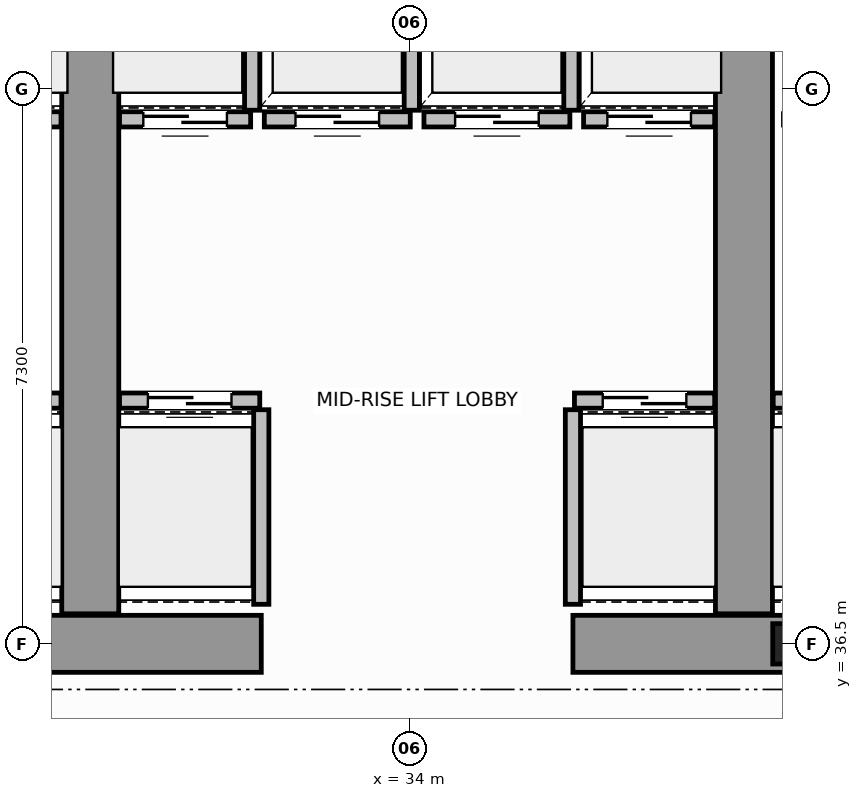
"""IFC4 building model, lengths in metres.
Left out: names, types, materials, properties, quantities, classifications, styles, units other than length and angle.
Written with IfcOpenShell. Run it as: python <this file> out.ifc"""

import sys

from ifc_helpers import new_model, si_unit, direction, frame, frame_2d, origin, origin_2d, place, context, subcontext, project, spatial, rectangle, i_section, extrude, source, transform, mapped, element, fill, save


model = new_model("IFC4")
c1 = context("Model", 3, precision=1e-05, world=origin(), true_north=direction((0.0, 1.0)))
c2 = subcontext(c1, "Body", "Model", "MODEL_VIEW")
j1 = project(units=[si_unit("LENGTHUNIT", "METRE"), si_unit("PLANEANGLEUNIT", "RADIAN")], contexts=[c1])
p1 = place(None, origin())
s1 = spatial("IfcSite", under=j1, at=p1, CompositionType="ELEMENT")
p2 = place(p1, origin())
s2 = spatial("IfcBuilding", under=s1, at=p2, CompositionType="ELEMENT")
p3 = place(p2, frame((0.0, 0.0, 99.6)))
s3 = spatial("IfcBuildingStorey", under=s2, at=p3, CompositionType="ELEMENT", Elevation=99.6)
m1 = source(origin(), c2, "Body", "SweptSolid", [
    extrude(i_section(OverallWidth=0.442, OverallDepth=0.531, WebThickness=0.065, FlangeThickness=0.076, FilletRadius=0.015, at=origin_2d()), origin(), (0.0, 0.0, 1.0), 3.8),
])
p4 = place(p3, frame((39.0, 36.5, 0.0), z_axis=(0.0, 0.0, 1.0), x_axis=(1.0, 0.0, 0.0)))
e1 = element("IfcColumn", 1, at=p4, inside=s3, PredefinedType="COLUMN", context=c2, shape_type="MappedRepresentation", body=[
    mapped(m1, transform((0.0, 0.0, 0.0), scale=1.0)),
])
for number, where, z_axis, x_axis in (
    (2, (27.55, 36.5, 0.0), (0.0, 0.0, 1.0), (1.0, 0.0, 0.0)),
    (3, (36.15, 36.5, 0.0), (0.0, 0.0, 1.0), (1.0, 0.0, 0.0)),
):
    element("IfcWall", number, at=place(p3, frame(where, z_axis=z_axis, x_axis=x_axis)), inside=s3, PredefinedType="SHEAR", context=c2, shape_type="SweptSolid", body=[
        extrude(rectangle(XDim=4.5, YDim=0.75, at=frame_2d((2.25, 0.0))), origin(), (0.0, 0.0, 1.0), 3.8),
    ])
for number, where, z_axis, x_axis in (
    (4, (29.8, 36.895, 0.0), (0.0, 0.0, 1.0), (0.0, 1.0, 0.0)),
    (5, (38.4, 36.895, 0.0), (0.0, 0.0, 1.0), (0.0, 1.0, 0.0)),
):
    element("IfcWall", number, at=place(p3, frame(where, z_axis=z_axis, x_axis=x_axis)), inside=s3, PredefinedType="SHEAR", context=c2, shape_type="SweptSolid", body=[
        extrude(rectangle(XDim=9.305, YDim=0.75, at=frame_2d((4.652, 0.0))), origin(), (0.0, 0.0, 1.0), 3.8),
    ])
p5 = place(p3, frame((27.57, 39.7, 0.0), z_axis=(0.0, 0.0, 1.0), x_axis=(1.0, 0.0, 0.0)))
e6 = element("IfcWall", 6, at=p5, inside=s3, PredefinedType="SOLIDWALL", context=c2, shape_type="SweptSolid", body=[
    extrude(rectangle(XDim=1.845, YDim=0.2, at=frame_2d((0.922, 0.0))), origin(), (0.0, 0.0, 1.0), 3.58),
])
p6 = place(p5, frame((0.372, 0.0, 0.0)))
e7 = element("IfcOpeningElement", 7, at=p6, cuts=e6, PredefinedType="OPENING", context=c2, shape_type="SweptSolid", body=[
    extrude(rectangle(XDim=1.1, YDim=2.15, at=frame_2d((0.55, 1.075))), frame((0.0, 0.11, 0.0), z_axis=(0.0, -1.0, 0.0), x_axis=(1.0, 0.0, 0.0)), (0.0, 0.0, 1.0), 0.22),
])
p7 = place(p3, frame((27.69, 43.4, 0.0), z_axis=(0.0, 0.0, 1.0), x_axis=(1.0, 0.0, 0.0)))
e8 = element("IfcWall", 8, at=p7, inside=s3, PredefinedType="SOLIDWALL", context=c2, shape_type="SweptSolid", body=[
    extrude(rectangle(XDim=1.725, YDim=0.2, at=frame_2d((0.863, 0.0))), origin(), (0.0, 0.0, 1.0), 3.58),
])
p8 = place(p7, frame((0.312, 0.0, 0.0)))
e9 = element("IfcOpeningElement", 9, at=p8, cuts=e8, PredefinedType="OPENING", context=c2, shape_type="SweptSolid", body=[
    extrude(rectangle(XDim=1.1, YDim=2.15, at=frame_2d((0.55, 1.075))), frame((0.0, 0.11, 0.0), z_axis=(0.0, -1.0, 0.0), x_axis=(1.0, 0.0, 0.0)), (0.0, 0.0, 1.0), 0.22),
])
p9 = place(p3, frame((30.185, 39.7, 0.0), z_axis=(0.0, 0.0, 1.0), x_axis=(1.0, 0.0, 0.0)))
e10 = element("IfcWall", 10, at=p9, inside=s3, PredefinedType="SOLIDWALL", context=c2, shape_type="SweptSolid", body=[
    extrude(rectangle(XDim=1.845, YDim=0.2, at=frame_2d((0.922, 0.0))), origin(), (0.0, 0.0, 1.0), 3.58),
])
p10 = place(p9, frame((0.373, 0.0, 0.0)))
e11 = element("IfcOpeningElement", 11, at=p10, cuts=e10, PredefinedType="OPENING", context=c2, shape_type="SweptSolid", body=[
    extrude(rectangle(XDim=1.1, YDim=2.15, at=frame_2d((0.55, 1.075))), frame((0.0, 0.11, 0.0), z_axis=(0.0, -1.0, 0.0), x_axis=(1.0, 0.0, 0.0)), (0.0, 0.0, 1.0), 0.22),
])
p11 = place(p3, frame((32.05, 37.02, 0.0), z_axis=(0.0, 0.0, 1.0), x_axis=(0.0, 1.0, 0.0)))
e12 = element("IfcWall", 12, at=p11, inside=s3, PredefinedType="SOLIDWALL", context=c2, shape_type="SweptSolid", body=[
    extrude(rectangle(XDim=2.56, YDim=0.2, at=frame_2d((1.28, 0.0))), origin(), (0.0, 0.0, 1.0), 3.58),
])
p12 = place(p3, frame((36.17, 39.7, 0.0), z_axis=(0.0, 0.0, 1.0), x_axis=(1.0, 0.0, 0.0)))
e13 = element("IfcWall", 13, at=p12, inside=s3, PredefinedType="SOLIDWALL", context=c2, shape_type="SweptSolid", body=[
    extrude(rectangle(XDim=1.845, YDim=0.2, at=frame_2d((0.922, 0.0))), origin(), (0.0, 0.0, 1.0), 3.58),
])
p13 = place(p12, frame((0.372, 0.0, 0.0)))
e14 = element("IfcOpeningElement", 14, at=p13, cuts=e13, PredefinedType="OPENING", context=c2, shape_type="SweptSolid", body=[
    extrude(rectangle(XDim=1.1, YDim=2.15, at=frame_2d((0.55, 1.075))), frame((0.0, 0.11, 0.0), z_axis=(0.0, -1.0, 0.0), x_axis=(1.0, 0.0, 0.0)), (0.0, 0.0, 1.0), 0.22),
])
p14 = place(p3, frame((36.15, 37.02, 0.0), z_axis=(0.0, 0.0, 1.0), x_axis=(0.0, 1.0, 0.0)))
e15 = element("IfcWall", 15, at=p14, inside=s3, PredefinedType="SOLIDWALL", context=c2, shape_type="SweptSolid", body=[
    extrude(rectangle(XDim=2.56, YDim=0.2, at=frame_2d((1.28, 0.0))), origin(), (0.0, 0.0, 1.0), 3.58),
])
p15 = place(p3, frame((30.185, 43.4, 0.0), z_axis=(0.0, 0.0, 1.0), x_axis=(1.0, 0.0, 0.0)))
e16 = element("IfcWall", 16, at=p15, inside=s3, PredefinedType="SOLIDWALL", context=c2, shape_type="SweptSolid", body=[
    extrude(rectangle(XDim=1.725, YDim=0.2, at=frame_2d((0.862, 0.0))), origin(), (0.0, 0.0, 1.0), 3.58),
])
p16 = place(p15, frame((0.313, 0.0, 0.0)))
e17 = element("IfcOpeningElement", 17, at=p16, cuts=e16, PredefinedType="OPENING", context=c2, shape_type="SweptSolid", body=[
    extrude(rectangle(XDim=1.1, YDim=2.15, at=frame_2d((0.55, 1.075))), frame((0.0, 0.11, 0.0), z_axis=(0.0, -1.0, 0.0), x_axis=(1.0, 0.0, 0.0)), (0.0, 0.0, 1.0), 0.22),
])
p17 = place(p3, frame((31.93, 43.52, 0.0), z_axis=(0.0, 0.0, 1.0), x_axis=(0.0, 1.0, 0.0)))
e18 = element("IfcWall", 18, at=p17, inside=s3, PredefinedType="SOLIDWALL", context=c2, shape_type="SweptSolid", body=[
    extrude(rectangle(XDim=2.56, YDim=0.2, at=frame_2d((1.28, 0.0))), origin(), (0.0, 0.0, 1.0), 3.58),
])
p18 = place(p3, frame((32.09, 43.4, 0.0), z_axis=(0.0, 0.0, 1.0), x_axis=(1.0, 0.0, 0.0)))
e19 = element("IfcWall", 19, at=p18, inside=s3, PredefinedType="SOLIDWALL", context=c2, shape_type="SweptSolid", body=[
    extrude(rectangle(XDim=1.92, YDim=0.2, at=frame_2d((0.96, 0.0))), origin(), (0.0, 0.0, 1.0), 3.58),
])
p19 = place(p18, frame((0.41, 0.0, 0.0)))
e20 = element("IfcOpeningElement", 20, at=p19, cuts=e19, PredefinedType="OPENING", context=c2, shape_type="SweptSolid", body=[
    extrude(rectangle(XDim=1.1, YDim=2.15, at=frame_2d((0.55, 1.075))), frame((0.0, 0.11, 0.0), z_axis=(0.0, -1.0, 0.0), x_axis=(1.0, 0.0, 0.0)), (0.0, 0.0, 1.0), 0.22),
])
p20 = place(p3, frame((34.03, 43.52, 0.0), z_axis=(0.0, 0.0, 1.0), x_axis=(0.0, 1.0, 0.0)))
e21 = element("IfcWall", 21, at=p20, inside=s3, PredefinedType="SOLIDWALL", context=c2, shape_type="SweptSolid", body=[
    extrude(rectangle(XDim=2.56, YDim=0.2, at=frame_2d((1.28, 0.0))), origin(), (0.0, 0.0, 1.0), 3.58),
])
p21 = place(p3, frame((34.19, 43.4, 0.0), z_axis=(0.0, 0.0, 1.0), x_axis=(1.0, 0.0, 0.0)))
e22 = element("IfcWall", 22, at=p21, inside=s3, PredefinedType="SOLIDWALL", context=c2, shape_type="SweptSolid", body=[
    extrude(rectangle(XDim=1.92, YDim=0.2, at=frame_2d((0.96, 0.0))), origin(), (0.0, 0.0, 1.0), 3.58),
])
p22 = place(p21, frame((0.41, 0.0, 0.0)))
e23 = element("IfcOpeningElement", 23, at=p22, cuts=e22, PredefinedType="OPENING", context=c2, shape_type="SweptSolid", body=[
    extrude(rectangle(XDim=1.1, YDim=2.15, at=frame_2d((0.55, 1.075))), frame((0.0, 0.11, 0.0), z_axis=(0.0, -1.0, 0.0), x_axis=(1.0, 0.0, 0.0)), (0.0, 0.0, 1.0), 0.22),
])
p23 = place(p3, frame((36.13, 43.52, 0.0), z_axis=(0.0, 0.0, 1.0), x_axis=(0.0, 1.0, 0.0)))
e24 = element("IfcWall", 24, at=p23, inside=s3, PredefinedType="SOLIDWALL", context=c2, shape_type="SweptSolid", body=[
    extrude(rectangle(XDim=2.56, YDim=0.2, at=frame_2d((1.28, 0.0))), origin(), (0.0, 0.0, 1.0), 3.58),
])
p24 = place(p3, frame((36.29, 43.4, 0.0), z_axis=(0.0, 0.0, 1.0), x_axis=(1.0, 0.0, 0.0)))
e25 = element("IfcWall", 25, at=p24, inside=s3, PredefinedType="SOLIDWALL", context=c2, shape_type="SweptSolid", body=[
    extrude(rectangle(XDim=1.725, YDim=0.2, at=frame_2d((0.862, 0.0))), origin(), (0.0, 0.0, 1.0), 3.58),
])
p25 = place(p24, frame((0.313, 0.0, 0.0)))
e26 = element("IfcOpeningElement", 26, at=p25, cuts=e25, PredefinedType="OPENING", context=c2, shape_type="SweptSolid", body=[
    extrude(rectangle(XDim=1.1, YDim=2.15, at=frame_2d((0.55, 1.075))), frame((0.0, 0.11, 0.0), z_axis=(0.0, -1.0, 0.0), x_axis=(1.0, 0.0, 0.0)), (0.0, 0.0, 1.0), 0.22),
])
p26 = place(p3, frame((38.785, 39.7, 0.0), z_axis=(0.0, 0.0, 1.0), x_axis=(1.0, 0.0, 0.0)))
e27 = element("IfcWall", 27, at=p26, inside=s3, PredefinedType="SOLIDWALL", context=c2, shape_type="SweptSolid", body=[
    extrude(rectangle(XDim=1.845, YDim=0.2, at=frame_2d((0.922, 0.0))), origin(), (0.0, 0.0, 1.0), 3.58),
])
p27 = place(p26, frame((0.373, 0.0, 0.0)))
e28 = element("IfcOpeningElement", 28, at=p27, cuts=e27, PredefinedType="OPENING", context=c2, shape_type="SweptSolid", body=[
    extrude(rectangle(XDim=1.1, YDim=2.15, at=frame_2d((0.55, 1.075))), frame((0.0, 0.11, 0.0), z_axis=(0.0, -1.0, 0.0), x_axis=(1.0, 0.0, 0.0)), (0.0, 0.0, 1.0), 0.22),
])
m2 = source(origin(), c2, "Body", "SweptSolid", [
    extrude(rectangle(XDim=1.1, YDim=2.15, at=frame_2d((0.55, 1.075))), frame((0.0, 0.025, 0.0), z_axis=(0.0, -1.0, 0.0), x_axis=(1.0, 0.0, 0.0)), (0.0, 0.0, 1.0), 0.05),
])
p28 = place(p10, origin())
e29 = element("IfcDoor", 29, at=p28, inside=s3, OperationType="DOUBLE_DOOR_SLIDING", PredefinedType="DOOR", context=c2, shape_type="MappedRepresentation", body=[
    mapped(m2, transform((0.0, 0.0, 0.0), scale=1.0)),
])
fill(e11, e29)
p29 = place(p13, origin())
e30 = element("IfcDoor", 30, at=p29, inside=s3, OperationType="DOUBLE_DOOR_SLIDING", PredefinedType="DOOR", context=c2, shape_type="MappedRepresentation", body=[
    mapped(m2, transform((0.0, 0.0, 0.0), scale=1.0)),
])
fill(e14, e30)
p30 = place(p16, origin())
e31 = element("IfcDoor", 31, at=p30, inside=s3, OperationType="DOUBLE_DOOR_SLIDING", PredefinedType="DOOR", context=c2, shape_type="MappedRepresentation", body=[
    mapped(m2, transform((0.0, 0.0, 0.0), scale=1.0)),
])
fill(e17, e31)
p31 = place(p19, origin())
e32 = element("IfcDoor", 32, at=p31, inside=s3, OperationType="DOUBLE_DOOR_SLIDING", PredefinedType="DOOR", context=c2, shape_type="MappedRepresentation", body=[
    mapped(m2, transform((0.0, 0.0, 0.0), scale=1.0)),
])
fill(e20, e32)
p32 = place(p22, origin())
e33 = element("IfcDoor", 33, at=p32, inside=s3, OperationType="DOUBLE_DOOR_SLIDING", PredefinedType="DOOR", context=c2, shape_type="MappedRepresentation", body=[
    mapped(m2, transform((0.0, 0.0, 0.0), scale=1.0)),
])
fill(e23, e33)
p33 = place(p25, origin())
e34 = element("IfcDoor", 34, at=p33, inside=s3, OperationType="DOUBLE_DOOR_SLIDING", PredefinedType="DOOR", context=c2, shape_type="MappedRepresentation", body=[
    mapped(m2, transform((0.0, 0.0, 0.0), scale=1.0)),
])
fill(e26, e34)
save(model, sys.argv[1])
